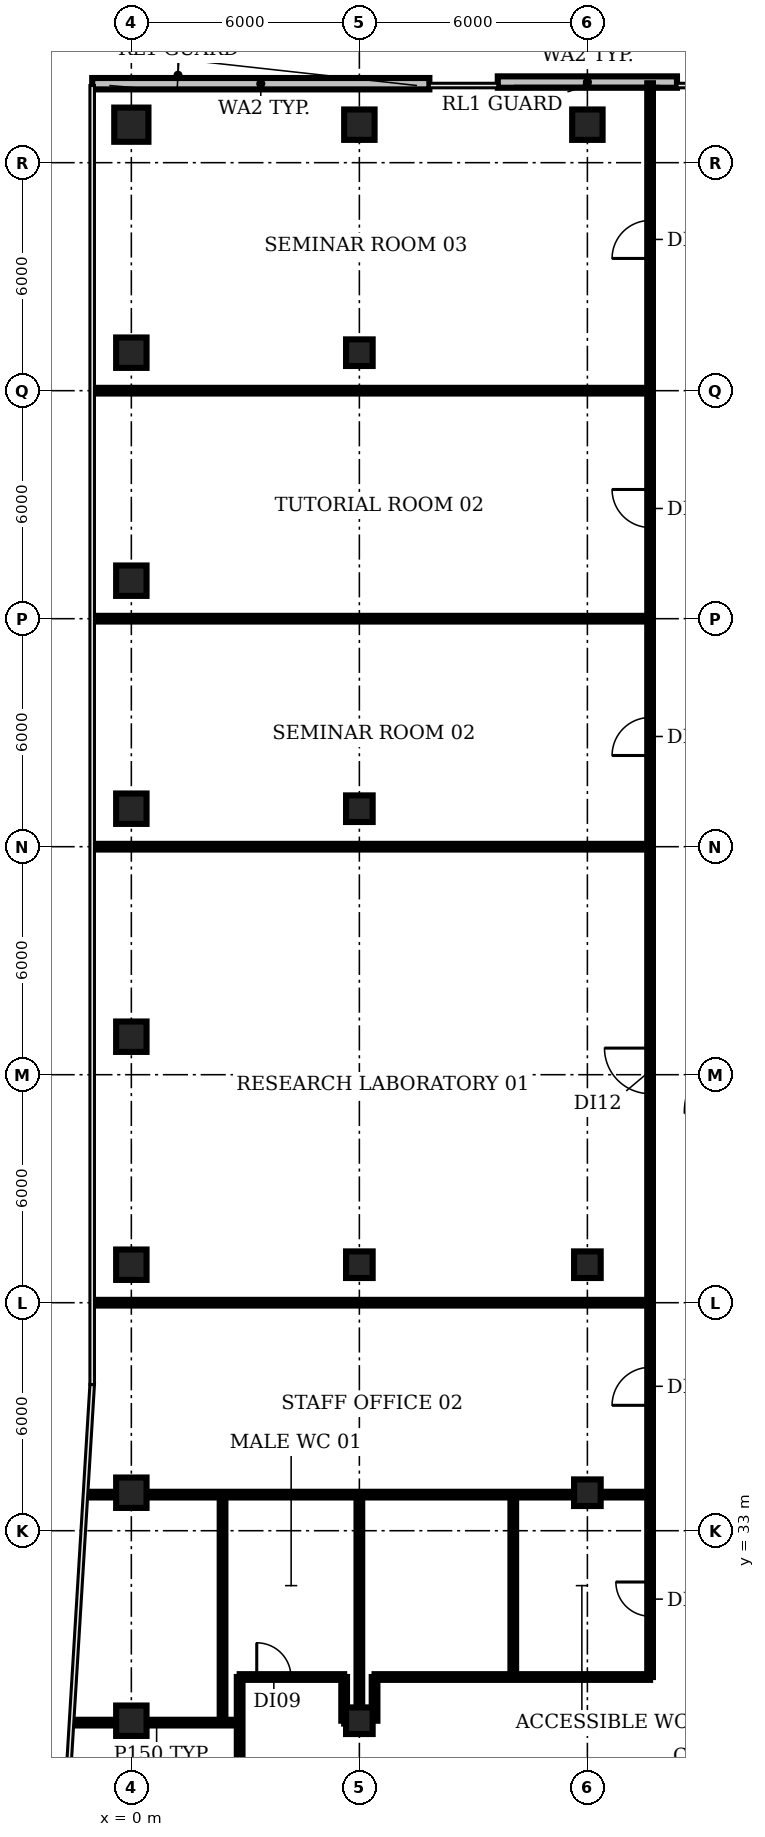
"""IFC4 building model, lengths in metres.
Left out: names, types, materials, properties, quantities, classifications, styles, units other than length and angle.
Written with IfcOpenShell. Run it as: python <this file> out.ifc"""

import sys

from ifc_helpers import new_model, si_unit, direction, frame, frame_2d, origin, origin_2d, place, context, subcontext, project, spatial, rectangle, circle, extrude, element, fill, save


model = new_model("IFC4")
c1 = context("Model", 3, precision=1e-05, world=origin(), true_north=direction((0.0, 1.0)))
c2 = subcontext(c1, "Body", "Model", "MODEL_VIEW")
j1 = project(units=[si_unit("LENGTHUNIT", "METRE"), si_unit("PLANEANGLEUNIT", "RADIAN")], contexts=[c1])
p1 = place(None, origin())
s1 = spatial("IfcSite", under=j1, at=p1, CompositionType="ELEMENT")
p2 = place(p1, origin())
s2 = spatial("IfcBuilding", under=s1, at=p2, CompositionType="ELEMENT")
p3 = place(p2, frame((0.0, 0.0, 243.2)))
s3 = spatial("IfcBuildingStorey", under=s2, at=p3, CompositionType="ELEMENT", Elevation=243.2)
for number, where, z_axis, x_axis in (
    (1, (0.0, 28.0, 0.0), (0.0, 0.0, 1.0), (1.0, 0.0, 0.0)),
    (2, (0.0, 34.0, 0.0), (0.0, 0.0, 1.0), (1.0, 0.0, 0.0)),
    (3, (0.0, 40.0, 0.0), (0.0, 0.0, 1.0), (1.0, 0.0, 0.0)),
    (4, (0.0, 46.0, 0.0), (0.0, 0.0, 1.0), (1.0, 0.0, 0.0)),
    (5, (0.0, 52.0, 0.0), (0.0, 0.0, 1.0), (1.0, 0.0, 0.0)),
    (6, (0.0, 58.0, 0.0), (0.0, 0.0, 1.0), (1.0, 0.0, 0.0)),
    (7, (0.0, 64.0, 0.0), (0.0, 0.0, 1.0), (1.0, 0.0, 0.0)),
):
    element("IfcColumn", number, at=place(p3, frame(where, z_axis=z_axis, x_axis=x_axis)), inside=s3, PredefinedType="COLUMN", context=c2, shape_type="SweptSolid", body=[
        extrude(rectangle(XDim=0.8, YDim=0.8, at=origin_2d()), origin(), (0.0, 0.0, 1.0), 3.85),
    ])
p4 = place(p3, frame((0.0, 70.0, 0.0), z_axis=(0.0, 0.0, 1.0), x_axis=(1.0, 0.0, 0.0)))
e8 = element("IfcColumn", 8, at=p4, inside=s3, PredefinedType="COLUMN", context=c2, shape_type="SweptSolid", body=[
    extrude(circle(Radius=0.45, at=origin_2d()), origin(), (0.0, 0.0, 1.0), 3.85),
])
for number, where, z_axis, x_axis in (
    (9, (6.0, 28.0, 0.0), (0.0, 0.0, 1.0), (1.0, 0.0, 0.0)),
    (10, (6.0, 40.0, 0.0), (0.0, 0.0, 1.0), (1.0, 0.0, 0.0)),
    (11, (6.0, 52.0, 0.0), (0.0, 0.0, 1.0), (1.0, 0.0, 0.0)),
    (12, (6.0, 64.0, 0.0), (0.0, 0.0, 1.0), (1.0, 0.0, 0.0)),
):
    element("IfcColumn", number, at=place(p3, frame(where, z_axis=z_axis, x_axis=x_axis)), inside=s3, PredefinedType="COLUMN", context=c2, shape_type="SweptSolid", body=[
        extrude(rectangle(XDim=0.7, YDim=0.7, at=origin_2d()), origin(), (0.0, 0.0, 1.0), 3.85),
    ])
p5 = place(p3, frame((6.0, 70.0, 0.0), z_axis=(0.0, 0.0, 1.0), x_axis=(1.0, 0.0, 0.0)))
e13 = element("IfcColumn", 13, at=p5, inside=s3, PredefinedType="COLUMN", context=c2, shape_type="SweptSolid", body=[
    extrude(rectangle(XDim=0.8, YDim=0.8, at=origin_2d()), origin(), (0.0, 0.0, 1.0), 3.85),
])
for number, where, z_axis, x_axis in (
    (14, (12.0, 34.0, 0.0), (0.0, 0.0, 1.0), (1.0, 0.0, 0.0)),
    (15, (12.0, 40.0, 0.0), (0.0, 0.0, 1.0), (1.0, 0.0, 0.0)),
):
    element("IfcColumn", number, at=place(p3, frame(where, z_axis=z_axis, x_axis=x_axis)), inside=s3, PredefinedType="COLUMN", context=c2, shape_type="SweptSolid", body=[
        extrude(rectangle(XDim=0.7, YDim=0.7, at=origin_2d()), origin(), (0.0, 0.0, 1.0), 3.85),
    ])
p6 = place(p3, frame((12.0, 70.0, 0.0), z_axis=(0.0, 0.0, 1.0), x_axis=(1.0, 0.0, 0.0)))
e16 = element("IfcColumn", 16, at=p6, inside=s3, PredefinedType="COLUMN", context=c2, shape_type="SweptSolid", body=[
    extrude(rectangle(XDim=0.8, YDim=0.8, at=origin_2d()), origin(), (0.0, 0.0, 1.0), 3.85),
])
p7 = place(p3, frame((14.357, 71.122, 0.0), z_axis=(0.0, 0.0, 1.0), x_axis=(-1.0, 0.0, 0.0)))
e17 = element("IfcWall", 17, at=p7, inside=s3, PredefinedType="SOLIDWALL", context=c2, shape_type="SweptSolid", body=[
    extrude(rectangle(XDim=4.715, YDim=0.3, at=frame_2d((2.357, 0.0))), origin(), (0.0, 0.0, 1.0), 3.85),
])
p8 = place(p3, frame((7.843, 71.078, 0.0), z_axis=(0.0, 0.0, 1.0), x_axis=(-1.0, 0.0, 0.0)))
e18 = element("IfcWall", 18, at=p8, inside=s3, PredefinedType="SOLIDWALL", context=c2, shape_type="SweptSolid", body=[
    extrude(rectangle(XDim=8.873, YDim=0.3, at=frame_2d((4.436, 0.0))), origin(), (0.0, 0.0, 1.0), 3.85),
])
p9 = place(p3, frame((-1.52, 27.95, 0.0), z_axis=(0.0, 0.0, 1.0), x_axis=(1.0, 0.0, 0.0)))
e19 = element("IfcWall", 19, at=p9, inside=s3, PredefinedType="PARTITIONING", context=c2, shape_type="SweptSolid", body=[
    extrude(rectangle(XDim=4.37, YDim=0.15, at=frame_2d((2.185, 0.0))), origin(), (0.0, 0.0, 1.0), 2.88),
])
p10 = place(p3, frame((-1.16, 33.95, 0.0), z_axis=(0.0, 0.0, 1.0), x_axis=(1.0, 0.0, 0.0)))
e20 = element("IfcWall", 20, at=p10, inside=s3, PredefinedType="PARTITIONING", context=c2, shape_type="SweptSolid", body=[
    extrude(rectangle(XDim=14.81, YDim=0.15, at=frame_2d((7.405, 0.0))), origin(), (0.0, 0.0, 1.0), 2.88),
])
for number, where, z_axis, x_axis in (
    (21, (-0.98, 39.0, 0.0), (0.0, 0.0, 1.0), (1.0, 0.0, 0.0)),
    (22, (-0.98, 51.0, 0.0), (0.0, 0.0, 1.0), (1.0, 0.0, 0.0)),
    (23, (-0.98, 57.0, 0.0), (0.0, 0.0, 1.0), (1.0, 0.0, 0.0)),
    (24, (-0.98, 63.0, 0.0), (0.0, 0.0, 1.0), (1.0, 0.0, 0.0)),
):
    element("IfcWall", number, at=place(p3, frame(where, z_axis=z_axis, x_axis=x_axis)), inside=s3, PredefinedType="PARTITIONING", context=c2, shape_type="SweptSolid", body=[
        extrude(rectangle(XDim=14.63, YDim=0.15, at=frame_2d((7.315, 0.0))), origin(), (0.0, 0.0, 1.0), 2.88),
    ])
p11 = place(p3, frame((2.4, 27.95, 0.0), z_axis=(0.0, 0.0, 1.0), x_axis=(0.0, 1.0, 0.0)))
e25 = element("IfcWall", 25, at=p11, inside=s3, PredefinedType="PARTITIONING", context=c2, shape_type="SweptSolid", body=[
    extrude(rectangle(XDim=6.0, YDim=0.15, at=frame_2d((3.0, 0.0))), origin(), (0.0, 0.0, 1.0), 2.88),
])
p12 = place(p3, frame((2.85, 25.25, 0.0), z_axis=(0.0, 0.0, 1.0), x_axis=(0.0, 1.0, 0.0)))
e26 = element("IfcWall", 26, at=p12, inside=s3, PredefinedType="PARTITIONING", context=c2, shape_type="SweptSolid", body=[
    extrude(rectangle(XDim=3.9, YDim=0.15, at=frame_2d((1.95, 0.0))), origin(), (0.0, 0.0, 1.0), 2.88),
])
p13 = place(p3, frame((2.85, 29.15, 0.0), z_axis=(0.0, 0.0, 1.0), x_axis=(1.0, 0.0, 0.0)))
e27 = element("IfcWall", 27, at=p13, inside=s3, PredefinedType="PARTITIONING", context=c2, shape_type="SweptSolid", body=[
    extrude(rectangle(XDim=2.75, YDim=0.15, at=frame_2d((1.375, 0.0))), origin(), (0.0, 0.0, 1.0), 2.88),
])
p14 = place(p13, frame((0.45, 0.0, 0.0)))
e28 = element("IfcOpeningElement", 28, at=p14, cuts=e27, PredefinedType="OPENING", context=c2, shape_type="SweptSolid", body=[
    extrude(rectangle(XDim=0.9, YDim=2.1, at=frame_2d((0.45, 1.05))), frame((0.0, 0.085, 0.0), z_axis=(0.0, -1.0, 0.0), x_axis=(1.0, 0.0, 0.0)), (0.0, 0.0, 1.0), 0.17),
])
p15 = place(p3, frame((5.6, 28.0, 0.0), z_axis=(0.0, 0.0, 1.0), x_axis=(0.0, 1.0, 0.0)))
e29 = element("IfcWall", 29, at=p15, inside=s3, PredefinedType="PARTITIONING", context=c2, shape_type="SweptSolid", body=[
    extrude(rectangle(XDim=1.15, YDim=0.15, at=frame_2d((0.575, 0.0))), origin(), (0.0, 0.0, 1.0), 2.88),
])
p16 = place(p3, frame((5.6, 28.0, 0.0), z_axis=(0.0, 0.0, 1.0), x_axis=(1.0, 0.0, 0.0)))
e30 = element("IfcWall", 30, at=p16, inside=s3, PredefinedType="PARTITIONING", context=c2, shape_type="SweptSolid", body=[
    extrude(rectangle(XDim=0.4, YDim=0.15, at=frame_2d((0.2, 0.0))), origin(), (0.0, 0.0, 1.0), 2.88),
])
p17 = place(p3, frame((6.0, 28.0, 0.0), z_axis=(0.0, 0.0, 1.0), x_axis=(0.0, 1.0, 0.0)))
e31 = element("IfcWall", 31, at=p17, inside=s3, PredefinedType="PARTITIONING", context=c2, shape_type="SweptSolid", body=[
    extrude(rectangle(XDim=5.95, YDim=0.15, at=frame_2d((2.975, 0.0))), origin(), (0.0, 0.0, 1.0), 2.88),
])
p18 = place(p3, frame((6.4, 28.0, 0.0), z_axis=(0.0, 0.0, 1.0), x_axis=(0.0, 1.0, 0.0)))
e32 = element("IfcWall", 32, at=p18, inside=s3, PredefinedType="PARTITIONING", context=c2, shape_type="SweptSolid", body=[
    extrude(rectangle(XDim=1.15, YDim=0.15, at=frame_2d((0.575, 0.0))), origin(), (0.0, 0.0, 1.0), 2.88),
])
p19 = place(p3, frame((6.4, 29.15, 0.0), z_axis=(0.0, 0.0, 1.0), x_axis=(1.0, 0.0, 0.0)))
e33 = element("IfcWall", 33, at=p19, inside=s3, PredefinedType="PARTITIONING", context=c2, shape_type="SweptSolid", body=[
    extrude(rectangle(XDim=7.25, YDim=0.15, at=frame_2d((3.625, 0.0))), origin(), (0.0, 0.0, 1.0), 2.88),
])
p20 = place(p3, frame((10.05, 29.15, 0.0), z_axis=(0.0, 0.0, 1.0), x_axis=(0.0, 1.0, 0.0)))
e34 = element("IfcWall", 34, at=p20, inside=s3, PredefinedType="PARTITIONING", context=c2, shape_type="SweptSolid", body=[
    extrude(rectangle(XDim=4.8, YDim=0.15, at=frame_2d((2.4, 0.0))), origin(), (0.0, 0.0, 1.0), 2.88),
])
p21 = place(p3, frame((13.65, 29.15, 0.0), z_axis=(0.0, 0.0, 1.0), x_axis=(0.0, 1.0, 0.0)))
e35 = element("IfcWall", 35, at=p21, inside=s3, PredefinedType="PARTITIONING", context=c2, shape_type="SweptSolid", body=[
    extrude(rectangle(XDim=4.8, YDim=0.15, at=frame_2d((2.4, 0.0))), origin(), (0.0, 0.0, 1.0), 2.88),
])
p22 = place(p21, frame((1.6, 0.0, 0.0)))
e36 = element("IfcOpeningElement", 36, at=p22, cuts=e35, PredefinedType="OPENING", context=c2, shape_type="SweptSolid", body=[
    extrude(rectangle(XDim=0.9, YDim=2.1, at=frame_2d((0.45, 1.05))), frame((0.0, 0.085, 0.0), z_axis=(0.0, -1.0, 0.0), x_axis=(1.0, 0.0, 0.0)), (0.0, 0.0, 1.0), 0.17),
])
p23 = place(p3, frame((13.65, 33.95, 0.0), z_axis=(0.0, 0.0, 1.0), x_axis=(0.0, 1.0, 0.0)))
e37 = element("IfcWall", 37, at=p23, inside=s3, PredefinedType="PARTITIONING", context=c2, shape_type="SweptSolid", body=[
    extrude(rectangle(XDim=5.05, YDim=0.15, at=frame_2d((2.525, 0.0))), origin(), (0.0, 0.0, 1.0), 2.88),
])
p24 = place(p23, frame((2.35, 0.0, 0.0)))
e38 = element("IfcOpeningElement", 38, at=p24, cuts=e37, PredefinedType="OPENING", context=c2, shape_type="SweptSolid", body=[
    extrude(rectangle(XDim=1.0, YDim=2.1, at=frame_2d((0.5, 1.05))), frame((0.0, 0.085, 0.0), z_axis=(0.0, -1.0, 0.0), x_axis=(1.0, 0.0, 0.0)), (0.0, 0.0, 1.0), 0.17),
])
p25 = place(p3, frame((13.65, 39.0, 0.0), z_axis=(0.0, 0.0, 1.0), x_axis=(0.0, 1.0, 0.0)))
e39 = element("IfcWall", 39, at=p25, inside=s3, PredefinedType="PARTITIONING", context=c2, shape_type="SweptSolid", body=[
    extrude(rectangle(XDim=12.0, YDim=0.15, at=frame_2d((6.0, 0.0))), origin(), (0.0, 0.0, 1.0), 2.88),
])
p26 = place(p25, frame((5.5, 0.0, 0.0)))
e40 = element("IfcOpeningElement", 40, at=p26, cuts=e39, PredefinedType="OPENING", context=c2, shape_type="SweptSolid", body=[
    extrude(rectangle(XDim=1.2, YDim=2.1, at=frame_2d((0.6, 1.05))), frame((0.0, 0.085, 0.0), z_axis=(0.0, -1.0, 0.0), x_axis=(1.0, 0.0, 0.0)), (0.0, 0.0, 1.0), 0.17),
])
p27 = place(p3, frame((13.65, 51.0, 0.0), z_axis=(0.0, 0.0, 1.0), x_axis=(0.0, 1.0, 0.0)))
e41 = element("IfcWall", 41, at=p27, inside=s3, PredefinedType="PARTITIONING", context=c2, shape_type="SweptSolid", body=[
    extrude(rectangle(XDim=6.0, YDim=0.15, at=frame_2d((3.0, 0.0))), origin(), (0.0, 0.0, 1.0), 2.88),
])
p28 = place(p27, frame((2.4, 0.0, 0.0)))
e42 = element("IfcOpeningElement", 42, at=p28, cuts=e41, PredefinedType="OPENING", context=c2, shape_type="SweptSolid", body=[
    extrude(rectangle(XDim=1.0, YDim=2.1, at=frame_2d((0.5, 1.05))), frame((0.0, 0.085, 0.0), z_axis=(0.0, -1.0, 0.0), x_axis=(1.0, 0.0, 0.0)), (0.0, 0.0, 1.0), 0.17),
])
p29 = place(p3, frame((13.65, 57.0, 0.0), z_axis=(0.0, 0.0, 1.0), x_axis=(0.0, 1.0, 0.0)))
e43 = element("IfcWall", 43, at=p29, inside=s3, PredefinedType="PARTITIONING", context=c2, shape_type="SweptSolid", body=[
    extrude(rectangle(XDim=6.0, YDim=0.15, at=frame_2d((3.0, 0.0))), origin(), (0.0, 0.0, 1.0), 2.88),
])
p30 = place(p29, frame((2.4, 0.0, 0.0)))
e44 = element("IfcOpeningElement", 44, at=p30, cuts=e43, PredefinedType="OPENING", context=c2, shape_type="SweptSolid", body=[
    extrude(rectangle(XDim=1.0, YDim=2.1, at=frame_2d((0.5, 1.05))), frame((0.0, 0.085, 0.0), z_axis=(0.0, -1.0, 0.0), x_axis=(1.0, 0.0, 0.0)), (0.0, 0.0, 1.0), 0.17),
])
p31 = place(p3, frame((13.65, 63.0, 0.0), z_axis=(0.0, 0.0, 1.0), x_axis=(0.0, 1.0, 0.0)))
e45 = element("IfcWall", 45, at=p31, inside=s3, PredefinedType="PARTITIONING", context=c2, shape_type="SweptSolid", body=[
    extrude(rectangle(XDim=8.09, YDim=0.15, at=frame_2d((4.045, 0.0))), origin(), (0.0, 0.0, 1.0), 2.88),
])
p32 = place(p31, frame((3.48, 0.0, 0.0)))
e46 = element("IfcOpeningElement", 46, at=p32, cuts=e45, PredefinedType="OPENING", context=c2, shape_type="SweptSolid", body=[
    extrude(rectangle(XDim=1.0, YDim=2.1, at=frame_2d((0.5, 1.05))), frame((0.0, 0.085, 0.0), z_axis=(0.0, -1.0, 0.0), x_axis=(1.0, 0.0, 0.0)), (0.0, 0.0, 1.0), 0.17),
])
p33 = place(p14, origin())
e47 = element("IfcDoor", 47, at=p33, inside=s3, OperationType="SINGLE_SWING_LEFT", PredefinedType="DOOR", context=c2, shape_type="SweptSolid", body=[
    extrude(rectangle(XDim=0.9, YDim=2.1, at=frame_2d((0.45, 1.05))), frame((0.0, 0.025, 0.0), z_axis=(0.0, -1.0, 0.0), x_axis=(1.0, 0.0, 0.0)), (0.0, 0.0, 1.0), 0.05),
])
fill(e28, e47)
p34 = place(p22, origin())
e48 = element("IfcDoor", 48, at=p34, inside=s3, OperationType="SINGLE_SWING_RIGHT", PredefinedType="DOOR", context=c2, shape_type="SweptSolid", body=[
    extrude(rectangle(XDim=0.9, YDim=2.1, at=frame_2d((0.45, 1.05))), frame((0.0, 0.025, 0.0), z_axis=(0.0, -1.0, 0.0), x_axis=(1.0, 0.0, 0.0)), (0.0, 0.0, 1.0), 0.05),
])
fill(e36, e48)
p35 = place(p24, origin())
e49 = element("IfcDoor", 49, at=p35, inside=s3, OperationType="SINGLE_SWING_LEFT", PredefinedType="DOOR", context=c2, shape_type="SweptSolid", body=[
    extrude(rectangle(XDim=1.0, YDim=2.1, at=frame_2d((0.5, 1.05))), frame((0.0, 0.025, 0.0), z_axis=(0.0, -1.0, 0.0), x_axis=(1.0, 0.0, 0.0)), (0.0, 0.0, 1.0), 0.05),
])
fill(e38, e49)
p36 = place(p26, origin())
e50 = element("IfcDoor", 50, at=p36, inside=s3, OperationType="SINGLE_SWING_RIGHT", PredefinedType="DOOR", context=c2, shape_type="SweptSolid", body=[
    extrude(rectangle(XDim=1.2, YDim=2.1, at=frame_2d((0.6, 1.05))), frame((0.0, 0.025, 0.0), z_axis=(0.0, -1.0, 0.0), x_axis=(1.0, 0.0, 0.0)), (0.0, 0.0, 1.0), 0.05),
])
fill(e40, e50)
p37 = place(p28, origin())
e51 = element("IfcDoor", 51, at=p37, inside=s3, OperationType="SINGLE_SWING_LEFT", PredefinedType="DOOR", context=c2, shape_type="SweptSolid", body=[
    extrude(rectangle(XDim=1.0, YDim=2.1, at=frame_2d((0.5, 1.05))), frame((0.0, 0.025, 0.0), z_axis=(0.0, -1.0, 0.0), x_axis=(1.0, 0.0, 0.0)), (0.0, 0.0, 1.0), 0.05),
])
fill(e42, e51)
p38 = place(p30, origin())
e52 = element("IfcDoor", 52, at=p38, inside=s3, OperationType="SINGLE_SWING_RIGHT", PredefinedType="DOOR", context=c2, shape_type="SweptSolid", body=[
    extrude(rectangle(XDim=1.0, YDim=2.1, at=frame_2d((0.5, 1.05))), frame((0.0, 0.025, 0.0), z_axis=(0.0, -1.0, 0.0), x_axis=(1.0, 0.0, 0.0)), (0.0, 0.0, 1.0), 0.05),
])
fill(e44, e52)
p39 = place(p32, origin())
e53 = element("IfcDoor", 53, at=p39, inside=s3, OperationType="SINGLE_SWING_LEFT", PredefinedType="DOOR", context=c2, shape_type="SweptSolid", body=[
    extrude(rectangle(XDim=1.0, YDim=2.1, at=frame_2d((0.5, 1.05))), frame((0.0, 0.025, 0.0), z_axis=(0.0, -1.0, 0.0), x_axis=(1.0, 0.0, 0.0)), (0.0, 0.0, 1.0), 0.05),
])
fill(e46, e53)
save(model, sys.argv[1])
